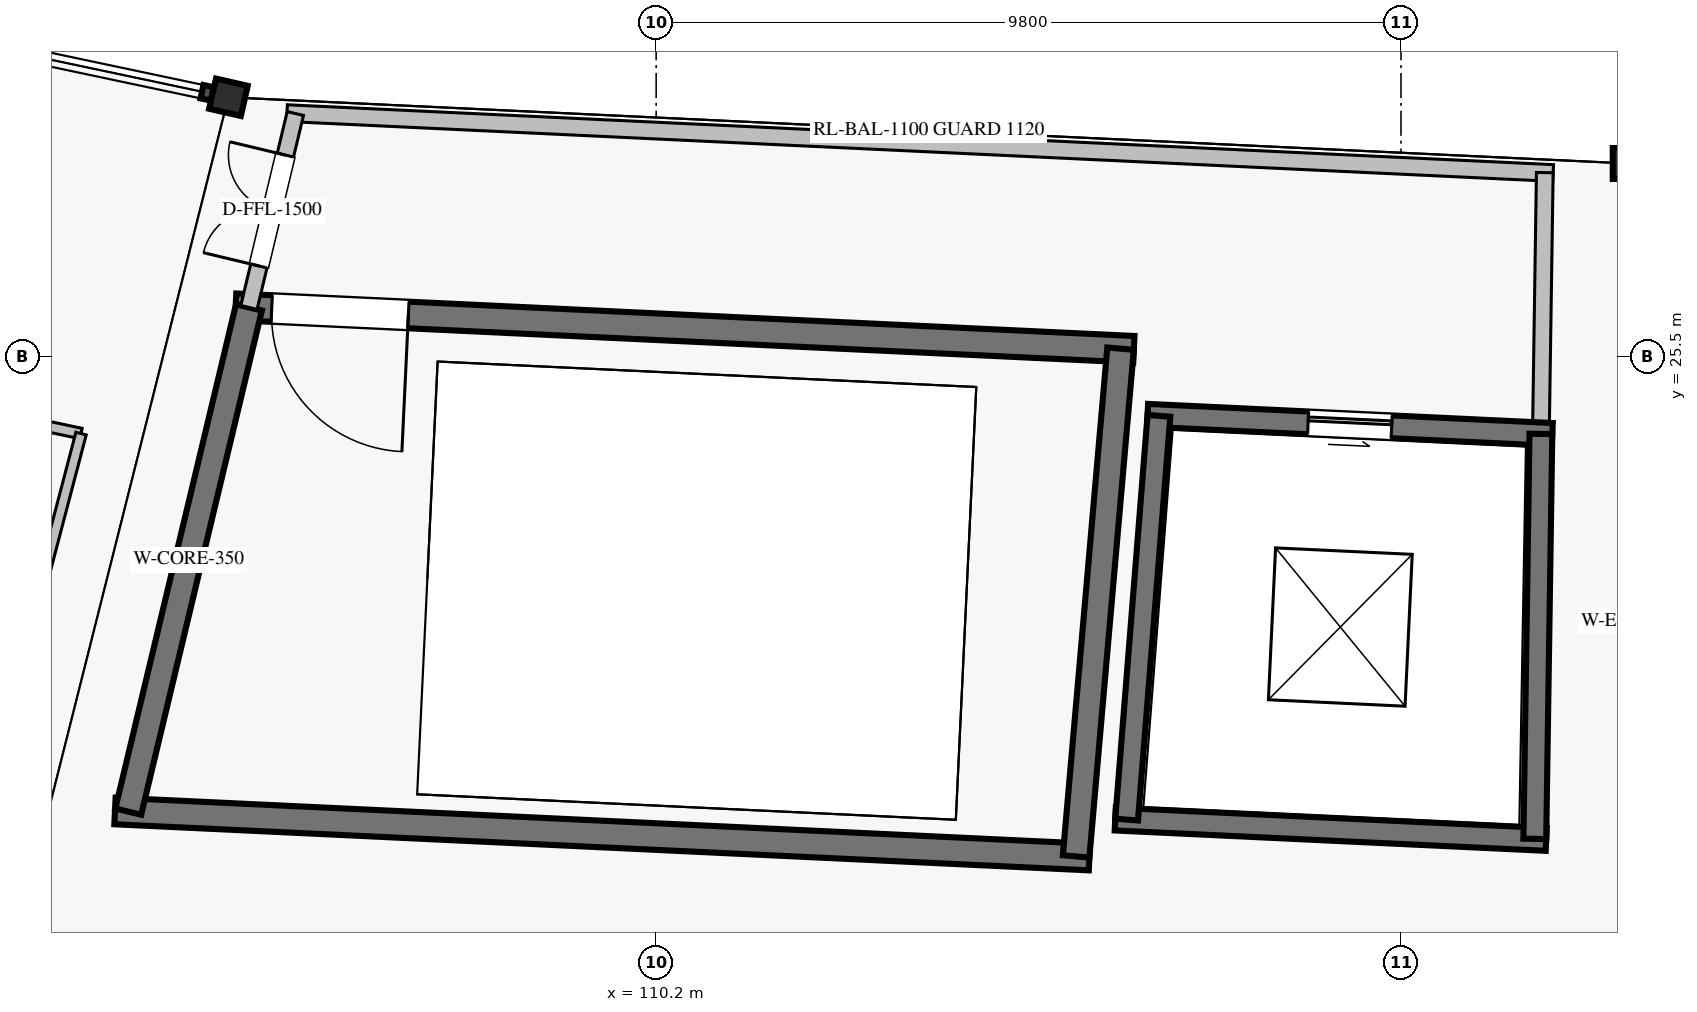
"""IFC4 building model, lengths in metres.
Left out: names, types, materials, properties, quantities, classifications, styles, units other than length and angle.
Written with IfcOpenShell. Run it as: python <this file> out.ifc"""

import sys

from ifc_helpers import new_model, si_unit, direction, frame, frame_2d, origin, origin_2d, place, context, subcontext, project, spatial, rectangle, i_section, extrude, element, fill, save


model = new_model("IFC4")
c1 = context("Model", 3, precision=1e-05, world=origin(), true_north=direction((0.0, 1.0)))
c2 = subcontext(c1, "Body", "Model", "MODEL_VIEW")
j1 = project(units=[si_unit("LENGTHUNIT", "METRE"), si_unit("PLANEANGLEUNIT", "RADIAN")], contexts=[c1])
p1 = place(None, origin())
s1 = spatial("IfcSite", under=j1, at=p1, CompositionType="ELEMENT")
p2 = place(p1, origin())
s2 = spatial("IfcBuilding", under=s1, at=p2, CompositionType="ELEMENT")
p3 = place(p2, frame((0.0, 0.0, 31.28)))
s3 = spatial("IfcBuildingStorey", under=s2, at=p3, CompositionType="ELEMENT", Elevation=31.28)
for number, where, z_axis, x_axis in (
    (1, (104.572, 28.911, 0.0), (0.0, 0.0, 1.0), (-0.223, -0.975, 0.0)),
    (2, (123.0, 28.04, 0.0), (0.0, 0.0, 1.0), (0.0, -1.0, 0.0)),
):
    element("IfcColumn", number, at=place(p3, frame(where, z_axis=z_axis, x_axis=x_axis)), inside=s3, PredefinedType="COLUMN", context=c2, shape_type="SweptSolid", body=[
        extrude(i_section(OverallWidth=0.407, OverallDepth=0.428, WebThickness=0.02, FlangeThickness=0.035, FilletRadius=0.013, at=origin_2d()), origin(), (0.0, 0.0, 1.0), 5.44),
    ])
p4 = place(p3, frame((104.667, 26.155, 0.0), z_axis=(0.0, 0.0, 1.0), x_axis=(0.998883770468, -0.04723571843, 0.0)))
e3 = element("IfcWall", 3, at=p4, inside=s3, PredefinedType="SHEAR", context=c2, shape_type="SweptSolid", body=[
    extrude(rectangle(XDim=11.831, YDim=0.35, at=frame_2d((5.916, 0.0))), origin(), (0.0, 0.0, 1.0), 5.16),
])
p5 = place(p4, frame((0.475, 0.0, 0.0)))
e4 = element("IfcOpeningElement", 4, at=p5, cuts=e3, PredefinedType="OPENING", context=c2, shape_type="SweptSolid", body=[
    extrude(rectangle(XDim=1.8, YDim=2.2, at=frame_2d((0.9, 1.1))), frame((0.0, 0.185, 0.0), z_axis=(0.0, -1.0, 0.0), x_axis=(1.0, 0.0, 0.0)), (0.0, 0.0, 1.0), 0.37),
])
p6 = place(p3, frame((103.08, 19.522, 0.0), z_axis=(0.0, 0.0, 1.0), x_axis=(0.998884004857, -0.047230761603, 0.0)))
e5 = element("IfcWall", 5, at=p6, inside=s3, PredefinedType="SHEAR", context=c2, shape_type="SweptSolid", body=[
    extrude(rectangle(XDim=12.835, YDim=0.35, at=frame_2d((6.417, 0.0))), origin(), (0.0, 0.0, 1.0), 5.16),
])
p7 = place(p3, frame((104.842, 26.146, 0.0), z_axis=(0.0, 0.0, 1.0), x_axis=(-0.232820532896, -0.972519716747, 0.0)))
e6 = element("IfcWall", 6, at=p7, inside=s3, PredefinedType="SHEAR", context=c2, shape_type="SweptSolid", body=[
    extrude(rectangle(XDim=6.82, YDim=0.35, at=frame_2d((3.41, 0.0))), origin(), (0.0, 0.0, 1.0), 5.16),
])
p8 = place(p3, frame((116.31, 25.604, 0.0), z_axis=(0.0, 0.0, 1.0), x_axis=(-0.087232889326, -0.996187945631, 0.0)))
e7 = element("IfcWall", 7, at=p8, inside=s3, PredefinedType="SHEAR", context=c2, shape_type="SweptSolid", body=[
    extrude(rectangle(XDim=6.706, YDim=0.35, at=frame_2d((3.353, 0.0))), origin(), (0.0, 0.0, 1.0), 5.16),
])
p9 = place(p3, frame((116.665, 24.728, 0.0), z_axis=(0.0, 0.0, 1.0), x_axis=(0.998882494219, -0.047262699282, 0.0)))
e8 = element("IfcWall", 8, at=p9, inside=s3, PredefinedType="SHEAR", context=c2, shape_type="SweptSolid", body=[
    extrude(rectangle(XDim=5.331, YDim=0.3, at=frame_2d((2.666, 0.0))), origin(), (0.0, 0.0, 1.0), 5.16),
])
p10 = place(p9, frame((2.115, 0.0, 0.0)))
e9 = element("IfcOpeningElement", 9, at=p10, cuts=e8, PredefinedType="OPENING", context=c2, shape_type="SweptSolid", body=[
    extrude(rectangle(XDim=1.1, YDim=2.2, at=frame_2d((0.55, 1.1))), frame((0.0, 0.16, 0.0), z_axis=(0.0, -1.0, 0.0), x_axis=(1.0, 0.0, 0.0)), (0.0, 0.0, 1.0), 0.32),
])
p11 = place(p3, frame((116.24, 19.416, 0.0), z_axis=(0.0, 0.0, 1.0), x_axis=(0.998884329444, -0.047223896393, 0.0)))
e10 = element("IfcWall", 10, at=p11, inside=s3, PredefinedType="SHEAR", context=c2, shape_type="SweptSolid", body=[
    extrude(rectangle(XDim=5.677, YDim=0.3, at=frame_2d((2.838, 0.0))), origin(), (0.0, 0.0, 1.0), 5.16),
])
p12 = place(p3, frame((116.815, 24.72, 0.0), z_axis=(0.0, 0.0, 1.0), x_axis=(-0.079807132276, -0.996810323802, 0.0)))
e11 = element("IfcWall", 11, at=p12, inside=s3, PredefinedType="SHEAR", context=c2, shape_type="SweptSolid", body=[
    extrude(rectangle(XDim=5.329, YDim=0.3, at=frame_2d((2.665, 0.0))), origin(), (0.0, 0.0, 1.0), 5.16),
])
p13 = place(p3, frame((121.84, 24.483, 0.0), z_axis=(0.0, 0.0, 1.0), x_axis=(-0.014935332807, -0.999888461697, 0.0)))
e12 = element("IfcWall", 12, at=p13, inside=s3, PredefinedType="SHEAR", context=c2, shape_type="SweptSolid", body=[
    extrude(rectangle(XDim=5.329, YDim=0.3, at=frame_2d((2.665, 0.0))), origin(), (0.0, 0.0, 1.0), 5.16),
])
p14 = place(p3, frame((105.343, 28.703, 0.0), z_axis=(0.0, 0.0, 1.0), x_axis=(0.998884242682, -0.047225731555, 0.0)))
e13 = element("IfcWall", 13, at=p14, inside=s3, PredefinedType="SOLIDWALL", context=c2, shape_type="SweptSolid", body=[
    extrude(rectangle(XDim=16.677, YDim=0.22, at=frame_2d((8.339, 0.0))), origin(), (0.0, 0.0, 1.0), 5.16),
])
p15 = place(p3, frame((105.453, 28.698, 0.0), z_axis=(0.0, 0.0, 1.0), x_axis=(-0.232756927197, -0.972534941707, 0.0)))
e14 = element("IfcWall", 14, at=p15, inside=s3, PredefinedType="SOLIDWALL", context=c2, shape_type="SweptSolid", body=[
    extrude(rectangle(XDim=2.623, YDim=0.22, at=frame_2d((1.312, 0.0))), origin(), (0.0, 0.0, 1.0), 5.16),
])
p16 = place(p15, frame((0.562, 0.0, 0.0)))
e15 = element("IfcOpeningElement", 15, at=p16, cuts=e14, PredefinedType="OPENING", context=c2, shape_type="SweptSolid", body=[
    extrude(rectangle(XDim=1.5, YDim=2.2, at=frame_2d((0.75, 1.1))), frame((0.0, 0.12, 0.0), z_axis=(0.0, -1.0, 0.0), x_axis=(1.0, 0.0, 0.0)), (0.0, 0.0, 1.0), 0.24),
])
p17 = place(p3, frame((121.892, 27.92, 0.0), z_axis=(0.0, 0.0, 1.0), x_axis=(-0.014984113027, -0.999887731876, 0.0)))
e16 = element("IfcWall", 16, at=p17, inside=s3, PredefinedType="SOLIDWALL", context=c2, shape_type="SweptSolid", body=[
    extrude(rectangle(XDim=3.438, YDim=0.22, at=frame_2d((1.719, 0.0))), origin(), (0.0, 0.0, 1.0), 5.16),
])
p18 = place(p3, frame((84.658, 28.29, 0.0), z_axis=(0.0, 0.0, 1.0), x_axis=(0.978344735835, -0.20698207136, 0.0)))
e17 = element("IfcWall", 17, at=p18, inside=s3, PredefinedType="PARTITIONING", context=c2, shape_type="SweptSolid", body=[
    extrude(rectangle(XDim=18.374, YDim=0.14, at=frame_2d((9.187, 0.0))), origin(), (0.0, 0.0, 1.0), 4.48),
])
p19 = place(p18, frame((8.612, 0.0, 0.0)))
e18 = element("IfcOpeningElement", 18, at=p19, cuts=e17, PredefinedType="OPENING", context=c2, shape_type="SweptSolid", body=[
    extrude(rectangle(XDim=1.15, YDim=2.25, at=frame_2d((0.575, 1.125))), frame((0.0, 0.08, 0.0), z_axis=(0.0, -1.0, 0.0), x_axis=(1.0, 0.0, 0.0)), (0.0, 0.0, 1.0), 0.16),
])
p20 = place(p3, frame((102.634, 24.487, 0.0), z_axis=(0.0, 0.0, 1.0), x_axis=(-0.254126047026, -0.967171108038, 0.0)))
e19 = element("IfcWall", 19, at=p20, inside=s3, PredefinedType="PARTITIONING", context=c2, shape_type="SweptSolid", body=[
    extrude(rectangle(XDim=6.839, YDim=0.14, at=frame_2d((3.42, 0.0))), origin(), (0.0, 0.0, 1.0), 4.48),
])
p21 = place(p5, frame((1.8, 0.0, 0.0), z_axis=(0.0, 0.0, 1.0), x_axis=(-1.0, 0.0, 0.0)))
e20 = element("IfcDoor", 20, at=p21, inside=s3, OperationType="SINGLE_SWING_LEFT", PredefinedType="DOOR", context=c2, shape_type="SweptSolid", body=[
    extrude(rectangle(XDim=1.8, YDim=2.2, at=frame_2d((0.9, 1.1))), frame((0.0, 0.025, 0.0), z_axis=(0.0, -1.0, 0.0), x_axis=(1.0, 0.0, 0.0)), (0.0, 0.0, 1.0), 0.05),
])
fill(e4, e20)
p22 = place(p10, origin())
e21 = element("IfcDoor", 21, at=p22, inside=s3, OperationType="SLIDING_TO_RIGHT", PredefinedType="DOOR", context=c2, shape_type="SweptSolid", body=[
    extrude(rectangle(XDim=1.1, YDim=2.2, at=frame_2d((0.55, 1.1))), frame((0.0, 0.025, 0.0), z_axis=(0.0, -1.0, 0.0), x_axis=(1.0, 0.0, 0.0)), (0.0, 0.0, 1.0), 0.05),
])
fill(e9, e21)
p23 = place(p16, frame((1.5, 0.0, 0.0), z_axis=(0.0, 0.0, 1.0), x_axis=(-1.0, 0.0, 0.0)))
e22 = element("IfcDoor", 22, at=p23, inside=s3, OperationType="DOUBLE_DOOR_SINGLE_SWING", PredefinedType="DOOR", context=c2, shape_type="SweptSolid", body=[
    extrude(rectangle(XDim=1.5, YDim=2.2, at=frame_2d((0.75, 1.1))), frame((0.0, 0.025, 0.0), z_axis=(0.0, -1.0, 0.0), x_axis=(1.0, 0.0, 0.0)), (0.0, 0.0, 1.0), 0.05),
])
fill(e15, e22)
save(model, sys.argv[1])
